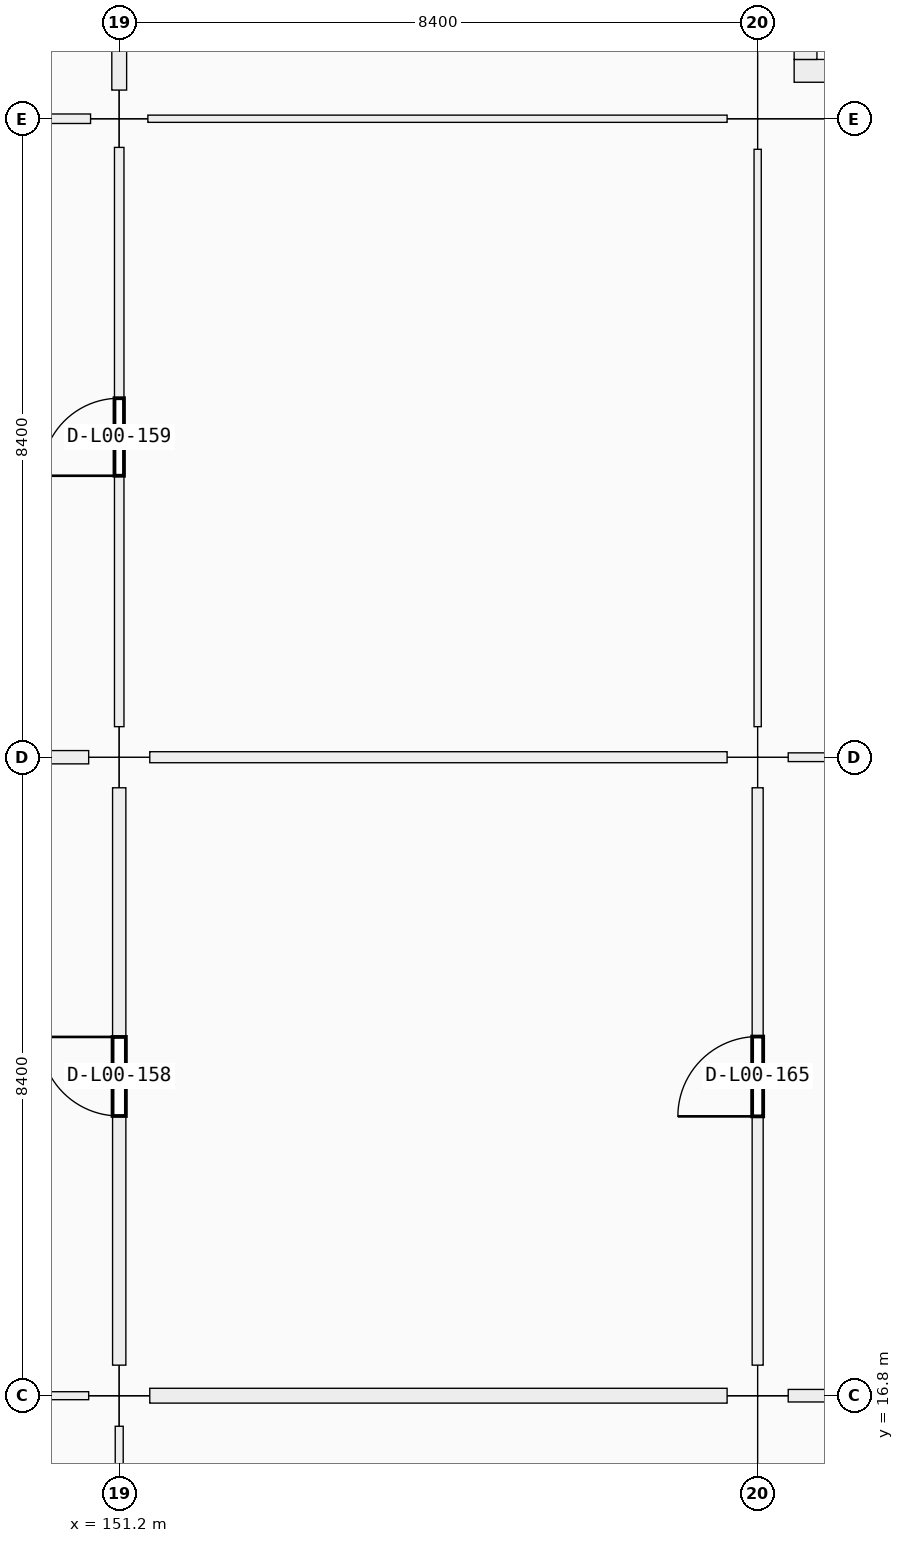
"""IFC4 building model, lengths in metres.
Left out: names, types, materials, properties, quantities, classifications, styles, units other than length and angle.
Written with IfcOpenShell. Run it as: python <this file> out.ifc"""

import sys

from ifc_helpers import new_model, si_unit, direction, frame, frame_2d, origin, origin_2d, place, context, subcontext, project, spatial, rectangle, extrude, element, fill, save


model = new_model("IFC4")
c1 = context("Model", 3, precision=1e-05, world=origin(), true_north=direction((0.0, 1.0)))
c2 = subcontext(c1, "Body", "Model", "MODEL_VIEW")
j1 = project(units=[si_unit("LENGTHUNIT", "METRE"), si_unit("PLANEANGLEUNIT", "RADIAN")], contexts=[c1])
p1 = place(None, origin())
s1 = spatial("IfcSite", under=j1, at=p1, CompositionType="ELEMENT")
p2 = place(p1, origin())
s2 = spatial("IfcBuilding", under=s1, at=p2, CompositionType="ELEMENT")
p3 = place(p2, origin())
s3 = spatial("IfcBuildingStorey", under=s2, at=p3, CompositionType="ELEMENT", Elevation=0.0)
for number, where, z_axis, x_axis in (
    (1, (151.2, 16.8, 0.0), (0.0, 0.0, 1.0), (1.0, 0.0, 0.0)),
    (2, (151.2, 25.2, 0.0), (0.0, 0.0, 1.0), (1.0, 0.0, 0.0)),
):
    element("IfcColumn", number, at=place(p3, frame(where, z_axis=z_axis, x_axis=x_axis)), inside=s3, PredefinedType="COLUMN", context=c2, shape_type="SweptSolid", body=[
        extrude(rectangle(XDim=0.8, YDim=0.8, at=origin_2d()), origin(), (0.0, 0.0, 1.0), 5.76),
    ])
p4 = place(p3, frame((151.2, 33.6, 0.0), z_axis=(0.0, 0.0, 1.0), x_axis=(1.0, 0.0, 0.0)))
e3 = element("IfcColumn", 3, at=p4, inside=s3, PredefinedType="COLUMN", context=c2, shape_type="SweptSolid", body=[
    extrude(rectangle(XDim=0.75, YDim=0.75, at=origin_2d()), origin(), (0.0, 0.0, 1.0), 5.51),
])
for number, where, z_axis, x_axis in (
    (4, (159.6, 16.8, 0.0), (0.0, 0.0, 1.0), (1.0, 0.0, 0.0)),
    (5, (159.6, 25.2, 0.0), (0.0, 0.0, 1.0), (1.0, 0.0, 0.0)),
    (6, (159.6, 33.6, 0.0), (0.0, 0.0, 1.0), (1.0, 0.0, 0.0)),
):
    element("IfcColumn", number, at=place(p3, frame(where, z_axis=z_axis, x_axis=x_axis)), inside=s3, PredefinedType="COLUMN", context=c2, shape_type="SweptSolid", body=[
        extrude(rectangle(XDim=0.8, YDim=0.8, at=origin_2d()), origin(), (0.0, 0.0, 1.0), 5.76),
    ])
p5 = place(p3, frame((167.52, 34.23, 0.0), z_axis=(0.0, 0.0, 1.0), x_axis=(-1.0, 0.0, 0.0)))
e7 = element("IfcWall", 7, at=p5, inside=s3, PredefinedType="SHEAR", context=c2, shape_type="SweptSolid", body=[
    extrude(rectangle(XDim=7.44, YDim=0.3, at=frame_2d((3.72, 0.0))), origin(), (0.0, 0.0, 1.0), 5.76),
])
p6 = place(p5, frame((1.28, 0.0, 0.0)))
e8 = element("IfcOpeningElement", 8, at=p6, cuts=e7, PredefinedType="OPENING", context=c2, shape_type="SweptSolid", body=[
    extrude(rectangle(XDim=1.5, YDim=2.15, at=frame_2d((0.75, 1.075))), frame((0.0, 0.15, 0.0), z_axis=(0.0, -1.0, 0.0), x_axis=(1.0, 0.0, 0.0)), (0.0, 0.0, 1.0), 0.3),
])
p7 = place(p3, frame((160.23, 34.38, 0.0), z_axis=(0.0, 0.0, 1.0), x_axis=(0.0, 1.0, 0.0)))
e9 = element("IfcWall", 9, at=p7, inside=s3, PredefinedType="SHEAR", context=c2, shape_type="SweptSolid", body=[
    extrude(rectangle(XDim=6.84, YDim=0.3, at=frame_2d((3.42, 0.0))), origin(), (0.0, 0.0, 1.0), 5.76),
])
p8 = place(p3, frame((143.202, 16.8, 0.0), z_axis=(0.0, 0.0, 1.0), x_axis=(1.0, 0.0, 0.0)))
e10 = element("IfcWall", 10, at=p8, inside=s3, PredefinedType="PARTITIONING", context=c2, shape_type="SweptSolid", body=[
    extrude(rectangle(XDim=7.596, YDim=0.105, at=frame_2d((3.798, 0.0))), origin(), (0.0, 0.0, 1.0), 3.66),
])
p9 = place(p8, frame((3.313, 0.0, 0.0)))
e11 = element("IfcOpeningElement", 11, at=p9, cuts=e10, PredefinedType="OPENING", context=c2, shape_type="SweptSolid", body=[
    extrude(rectangle(XDim=0.97, YDim=2.12, at=frame_2d((0.485, 1.06))), frame((0.0, 0.052, 0.0), z_axis=(0.0, -1.0, 0.0), x_axis=(1.0, 0.0, 0.0)), (0.0, 0.0, 1.0), 0.105),
])
p10 = place(p3, frame((143.202, 25.2, 0.0), z_axis=(0.0, 0.0, 1.0), x_axis=(1.0, 0.0, 0.0)))
e12 = element("IfcWall", 12, at=p10, inside=s3, PredefinedType="PARTITIONING", context=c2, shape_type="SweptSolid", body=[
    extrude(rectangle(XDim=7.596, YDim=0.175, at=frame_2d((3.798, 0.0))), origin(), (0.0, 0.0, 1.0), 3.66),
])
p11 = place(p10, frame((3.333, 0.0, 0.0)))
e13 = element("IfcOpeningElement", 13, at=p11, cuts=e12, PredefinedType="OPENING", context=c2, shape_type="SweptSolid", body=[
    extrude(rectangle(XDim=0.93, YDim=2.12, at=frame_2d((0.465, 1.06))), frame((0.0, 0.087, 0.0), z_axis=(0.0, -1.0, 0.0), x_axis=(1.0, 0.0, 0.0)), (0.0, 0.0, 1.0), 0.175),
])
p12 = place(p3, frame((143.202, 33.6, 0.0), z_axis=(0.0, 0.0, 1.0), x_axis=(1.0, 0.0, 0.0)))
e14 = element("IfcWall", 14, at=p12, inside=s3, PredefinedType="PARTITIONING", context=c2, shape_type="SweptSolid", body=[
    extrude(rectangle(XDim=7.621, YDim=0.125, at=frame_2d((3.811, 0.0))), origin(), (0.0, 0.0, 1.0), 3.66),
])
p13 = place(p12, frame((3.271, 0.0, 0.0)))
e15 = element("IfcOpeningElement", 15, at=p13, cuts=e14, PredefinedType="OPENING", context=c2, shape_type="SweptSolid", body=[
    extrude(rectangle(XDim=1.08, YDim=2.25, at=frame_2d((0.54, 1.125))), frame((0.0, 0.062, 0.0), z_axis=(0.0, -1.0, 0.0), x_axis=(1.0, 0.0, 0.0)), (0.0, 0.0, 1.0), 0.125),
])
p14 = place(p3, frame((151.602, 16.8, 0.0), z_axis=(0.0, 0.0, 1.0), x_axis=(1.0, 0.0, 0.0)))
e16 = element("IfcWall", 16, at=p14, inside=s3, PredefinedType="PARTITIONING", context=c2, shape_type="SweptSolid", body=[
    extrude(rectangle(XDim=7.596, YDim=0.195, at=frame_2d((3.798, 0.0))), origin(), (0.0, 0.0, 1.0), 3.66),
])
p15 = place(p14, frame((3.288, 0.0, 0.0)))
e17 = element("IfcOpeningElement", 17, at=p15, cuts=e16, PredefinedType="OPENING", context=c2, shape_type="SweptSolid", body=[
    extrude(rectangle(XDim=1.02, YDim=2.2, at=frame_2d((0.51, 1.1))), frame((0.0, 0.098, 0.0), z_axis=(0.0, -1.0, 0.0), x_axis=(1.0, 0.0, 0.0)), (0.0, 0.0, 1.0), 0.195),
])
p16 = place(p3, frame((151.602, 25.2, 0.0), z_axis=(0.0, 0.0, 1.0), x_axis=(1.0, 0.0, 0.0)))
e18 = element("IfcWall", 18, at=p16, inside=s3, PredefinedType="PARTITIONING", context=c2, shape_type="SweptSolid", body=[
    extrude(rectangle(XDim=7.596, YDim=0.145, at=frame_2d((3.798, 0.0))), origin(), (0.0, 0.0, 1.0), 3.66),
])
p17 = place(p16, frame((3.278, 0.0, 0.0)))
e19 = element("IfcOpeningElement", 19, at=p17, cuts=e18, PredefinedType="OPENING", context=c2, shape_type="SweptSolid", body=[
    extrude(rectangle(XDim=1.04, YDim=2.2, at=frame_2d((0.52, 1.1))), frame((0.0, 0.073, 0.0), z_axis=(0.0, -1.0, 0.0), x_axis=(1.0, 0.0, 0.0)), (0.0, 0.0, 1.0), 0.145),
])
p18 = place(p3, frame((151.577, 33.6, 0.0), z_axis=(0.0, 0.0, 1.0), x_axis=(1.0, 0.0, 0.0)))
e20 = element("IfcWall", 20, at=p18, inside=s3, PredefinedType="PARTITIONING", context=c2, shape_type="SweptSolid", body=[
    extrude(rectangle(XDim=7.621, YDim=0.095, at=frame_2d((3.811, 0.0))), origin(), (0.0, 0.0, 1.0), 3.66),
])
p19 = place(p18, frame((3.311, 0.0, 0.0)))
e21 = element("IfcOpeningElement", 21, at=p19, cuts=e20, PredefinedType="OPENING", context=c2, shape_type="SweptSolid", body=[
    extrude(rectangle(XDim=1.0, YDim=2.2, at=frame_2d((0.5, 1.1))), frame((0.0, 0.047, 0.0), z_axis=(0.0, -1.0, 0.0), x_axis=(1.0, 0.0, 0.0)), (0.0, 0.0, 1.0), 0.095),
])
p20 = place(p3, frame((160.002, 16.8, 0.0), z_axis=(0.0, 0.0, 1.0), x_axis=(1.0, 0.0, 0.0)))
e22 = element("IfcWall", 22, at=p20, inside=s3, PredefinedType="PARTITIONING", context=c2, shape_type="SweptSolid", body=[
    extrude(rectangle(XDim=7.596, YDim=0.165, at=frame_2d((3.798, 0.0))), origin(), (0.0, 0.0, 1.0), 3.66),
])
p21 = place(p20, frame((3.338, 0.0, 0.0)))
e23 = element("IfcOpeningElement", 23, at=p21, cuts=e22, PredefinedType="OPENING", context=c2, shape_type="SweptSolid", body=[
    extrude(rectangle(XDim=0.92, YDim=2.15, at=frame_2d((0.46, 1.075))), frame((0.0, 0.083, 0.0), z_axis=(0.0, -1.0, 0.0), x_axis=(1.0, 0.0, 0.0)), (0.0, 0.0, 1.0), 0.165),
])
p22 = place(p3, frame((160.002, 25.2, 0.0), z_axis=(0.0, 0.0, 1.0), x_axis=(1.0, 0.0, 0.0)))
e24 = element("IfcWall", 24, at=p22, inside=s3, PredefinedType="PARTITIONING", context=c2, shape_type="SweptSolid", body=[
    extrude(rectangle(XDim=7.596, YDim=0.115, at=frame_2d((3.798, 0.0))), origin(), (0.0, 0.0, 1.0), 3.66),
])
p23 = place(p22, frame((3.268, 0.0, 0.0)))
e25 = element("IfcOpeningElement", 25, at=p23, cuts=e24, PredefinedType="OPENING", context=c2, shape_type="SweptSolid", body=[
    extrude(rectangle(XDim=1.06, YDim=2.25, at=frame_2d((0.53, 1.125))), frame((0.0, 0.058, 0.0), z_axis=(0.0, -1.0, 0.0), x_axis=(1.0, 0.0, 0.0)), (0.0, 0.0, 1.0), 0.115),
])
p24 = place(p3, frame((151.2, 8.752, 0.0), z_axis=(0.0, 0.0, 1.0), x_axis=(0.0, 1.0, 0.0)))
e26 = element("IfcWall", 26, at=p24, inside=s3, PredefinedType="PARTITIONING", context=c2, shape_type="SweptSolid", body=[
    extrude(rectangle(XDim=7.646, YDim=0.105, at=frame_2d((3.823, 0.0))), origin(), (0.0, 0.0, 1.0), 3.66),
])
p25 = place(p24, frame((3.358, 0.0, 0.0)))
e27 = element("IfcOpeningElement", 27, at=p25, cuts=e26, PredefinedType="OPENING", context=c2, shape_type="SweptSolid", body=[
    extrude(rectangle(XDim=0.93, YDim=2.12, at=frame_2d((0.465, 1.06))), frame((0.0, 0.052, 0.0), z_axis=(0.0, -1.0, 0.0), x_axis=(1.0, 0.0, 0.0)), (0.0, 0.0, 1.0), 0.105),
])
p26 = place(p3, frame((151.2, 17.202, 0.0), z_axis=(0.0, 0.0, 1.0), x_axis=(0.0, 1.0, 0.0)))
e28 = element("IfcWall", 28, at=p26, inside=s3, PredefinedType="PARTITIONING", context=c2, shape_type="SweptSolid", body=[
    extrude(rectangle(XDim=7.596, YDim=0.175, at=frame_2d((3.798, 0.0))), origin(), (0.0, 0.0, 1.0), 3.66),
])
p27 = place(p26, frame((3.278, 0.0, 0.0)))
e29 = element("IfcOpeningElement", 29, at=p27, cuts=e28, PredefinedType="OPENING", context=c2, shape_type="SweptSolid", body=[
    extrude(rectangle(XDim=1.04, YDim=2.2, at=frame_2d((0.52, 1.1))), frame((0.0, 0.087, 0.0), z_axis=(0.0, -1.0, 0.0), x_axis=(1.0, 0.0, 0.0)), (0.0, 0.0, 1.0), 0.175),
])
p28 = place(p3, frame((151.2, 25.602, 0.0), z_axis=(0.0, 0.0, 1.0), x_axis=(0.0, 1.0, 0.0)))
e30 = element("IfcWall", 30, at=p28, inside=s3, PredefinedType="PARTITIONING", context=c2, shape_type="SweptSolid", body=[
    extrude(rectangle(XDim=7.621, YDim=0.125, at=frame_2d((3.811, 0.0))), origin(), (0.0, 0.0, 1.0), 3.66),
])
p29 = place(p28, frame((3.301, 0.0, 0.0)))
e31 = element("IfcOpeningElement", 31, at=p29, cuts=e30, PredefinedType="OPENING", context=c2, shape_type="SweptSolid", body=[
    extrude(rectangle(XDim=1.02, YDim=2.2, at=frame_2d((0.51, 1.1))), frame((0.0, 0.062, 0.0), z_axis=(0.0, -1.0, 0.0), x_axis=(1.0, 0.0, 0.0)), (0.0, 0.0, 1.0), 0.125),
])
p30 = place(p3, frame((151.2, 33.977, 0.0), z_axis=(0.0, 0.0, 1.0), x_axis=(0.0, 1.0, 0.0)))
e32 = element("IfcWall", 32, at=p30, inside=s3, PredefinedType="PARTITIONING", context=c2, shape_type="SweptSolid", body=[
    extrude(rectangle(XDim=7.671, YDim=0.195, at=frame_2d((3.835, 0.0))), origin(), (0.0, 0.0, 1.0), 3.66),
])
p31 = place(p30, frame((3.336, 0.0, 0.0)))
e33 = element("IfcOpeningElement", 33, at=p31, cuts=e32, PredefinedType="OPENING", context=c2, shape_type="SweptSolid", body=[
    extrude(rectangle(XDim=1.0, YDim=2.2, at=frame_2d((0.5, 1.1))), frame((0.0, 0.098, 0.0), z_axis=(0.0, -1.0, 0.0), x_axis=(1.0, 0.0, 0.0)), (0.0, 0.0, 1.0), 0.195),
])
p32 = place(p3, frame((159.6, 17.202, 0.0), z_axis=(0.0, 0.0, 1.0), x_axis=(0.0, 1.0, 0.0)))
e34 = element("IfcWall", 34, at=p32, inside=s3, PredefinedType="PARTITIONING", context=c2, shape_type="SweptSolid", body=[
    extrude(rectangle(XDim=7.596, YDim=0.145, at=frame_2d((3.798, 0.0))), origin(), (0.0, 0.0, 1.0), 3.66),
])
p33 = place(p32, frame((3.273, 0.0, 0.0)))
e35 = element("IfcOpeningElement", 35, at=p33, cuts=e34, PredefinedType="OPENING", context=c2, shape_type="SweptSolid", body=[
    extrude(rectangle(XDim=1.05, YDim=2.12, at=frame_2d((0.525, 1.06))), frame((0.0, 0.073, 0.0), z_axis=(0.0, -1.0, 0.0), x_axis=(1.0, 0.0, 0.0)), (0.0, 0.0, 1.0), 0.145),
])
p34 = place(p3, frame((159.6, 25.602, 0.0), z_axis=(0.0, 0.0, 1.0), x_axis=(0.0, 1.0, 0.0)))
e36 = element("IfcWall", 36, at=p34, inside=s3, PredefinedType="PARTITIONING", context=c2, shape_type="SweptSolid", body=[
    extrude(rectangle(XDim=7.596, YDim=0.095, at=frame_2d((3.798, 0.0))), origin(), (0.0, 0.0, 1.0), 3.66),
])
p35 = place(p34, frame((3.328, 0.0, 0.0)))
e37 = element("IfcOpeningElement", 37, at=p35, cuts=e36, PredefinedType="OPENING", context=c2, shape_type="SweptSolid", body=[
    extrude(rectangle(XDim=0.94, YDim=2.15, at=frame_2d((0.47, 1.075))), frame((0.0, 0.047, 0.0), z_axis=(0.0, -1.0, 0.0), x_axis=(1.0, 0.0, 0.0)), (0.0, 0.0, 1.0), 0.095),
])
p36 = place(p35, origin())
e38 = element("IfcDoor", 38, at=p36, inside=s3, OperationType="SINGLE_SWING_RIGHT", PredefinedType="DOOR", context=c2, shape_type="SweptSolid", body=[
    extrude(rectangle(XDim=0.94, YDim=2.15, at=frame_2d((0.47, 1.075))), frame((0.0, 0.025, 0.0), z_axis=(0.0, -1.0, 0.0), x_axis=(1.0, 0.0, 0.0)), (0.0, 0.0, 1.0), 0.05),
])
fill(e37, e38)
p37 = place(p15, origin())
e39 = element("IfcDoor", 39, at=p37, inside=s3, OperationType="SINGLE_SWING_RIGHT", PredefinedType="DOOR", context=c2, shape_type="SweptSolid", body=[
    extrude(rectangle(XDim=1.02, YDim=2.2, at=frame_2d((0.51, 1.1))), frame((0.0, 0.025, 0.0), z_axis=(0.0, -1.0, 0.0), x_axis=(1.0, 0.0, 0.0)), (0.0, 0.0, 1.0), 0.05),
])
fill(e17, e39)
p38 = place(p19, origin())
e40 = element("IfcDoor", 40, at=p38, inside=s3, OperationType="SINGLE_SWING_LEFT", PredefinedType="DOOR", context=c2, shape_type="SweptSolid", body=[
    extrude(rectangle(XDim=1.0, YDim=2.2, at=frame_2d((0.5, 1.1))), frame((0.0, 0.025, 0.0), z_axis=(0.0, -1.0, 0.0), x_axis=(1.0, 0.0, 0.0)), (0.0, 0.0, 1.0), 0.05),
])
fill(e21, e40)
p39 = place(p17, origin())
e41 = element("IfcDoor", 41, at=p39, inside=s3, OperationType="SINGLE_SWING_LEFT", PredefinedType="DOOR", context=c2, shape_type="SweptSolid", body=[
    extrude(rectangle(XDim=1.04, YDim=2.2, at=frame_2d((0.52, 1.1))), frame((0.0, 0.025, 0.0), z_axis=(0.0, -1.0, 0.0), x_axis=(1.0, 0.0, 0.0)), (0.0, 0.0, 1.0), 0.05),
])
fill(e19, e41)
p40 = place(p27, origin())
e42 = element("IfcDoor", 42, at=p40, inside=s3, OperationType="SINGLE_SWING_RIGHT", PredefinedType="DOOR", context=c2, shape_type="SweptSolid", body=[
    extrude(rectangle(XDim=1.04, YDim=2.2, at=frame_2d((0.52, 1.1))), frame((0.0, 0.025, 0.0), z_axis=(0.0, -1.0, 0.0), x_axis=(1.0, 0.0, 0.0)), (0.0, 0.0, 1.0), 0.05),
])
fill(e29, e42)
p41 = place(p29, origin())
e43 = element("IfcDoor", 43, at=p41, inside=s3, OperationType="SINGLE_SWING_LEFT", PredefinedType="DOOR", context=c2, shape_type="SweptSolid", body=[
    extrude(rectangle(XDim=1.02, YDim=2.2, at=frame_2d((0.51, 1.1))), frame((0.0, 0.025, 0.0), z_axis=(0.0, -1.0, 0.0), x_axis=(1.0, 0.0, 0.0)), (0.0, 0.0, 1.0), 0.05),
])
fill(e31, e43)
p42 = place(p33, origin())
e44 = element("IfcDoor", 44, at=p42, inside=s3, OperationType="SINGLE_SWING_LEFT", PredefinedType="DOOR", context=c2, shape_type="SweptSolid", body=[
    extrude(rectangle(XDim=1.05, YDim=2.12, at=frame_2d((0.525, 1.06))), frame((0.0, 0.025, 0.0), z_axis=(0.0, -1.0, 0.0), x_axis=(1.0, 0.0, 0.0)), (0.0, 0.0, 1.0), 0.05),
])
fill(e35, e44)
save(model, sys.argv[1])
